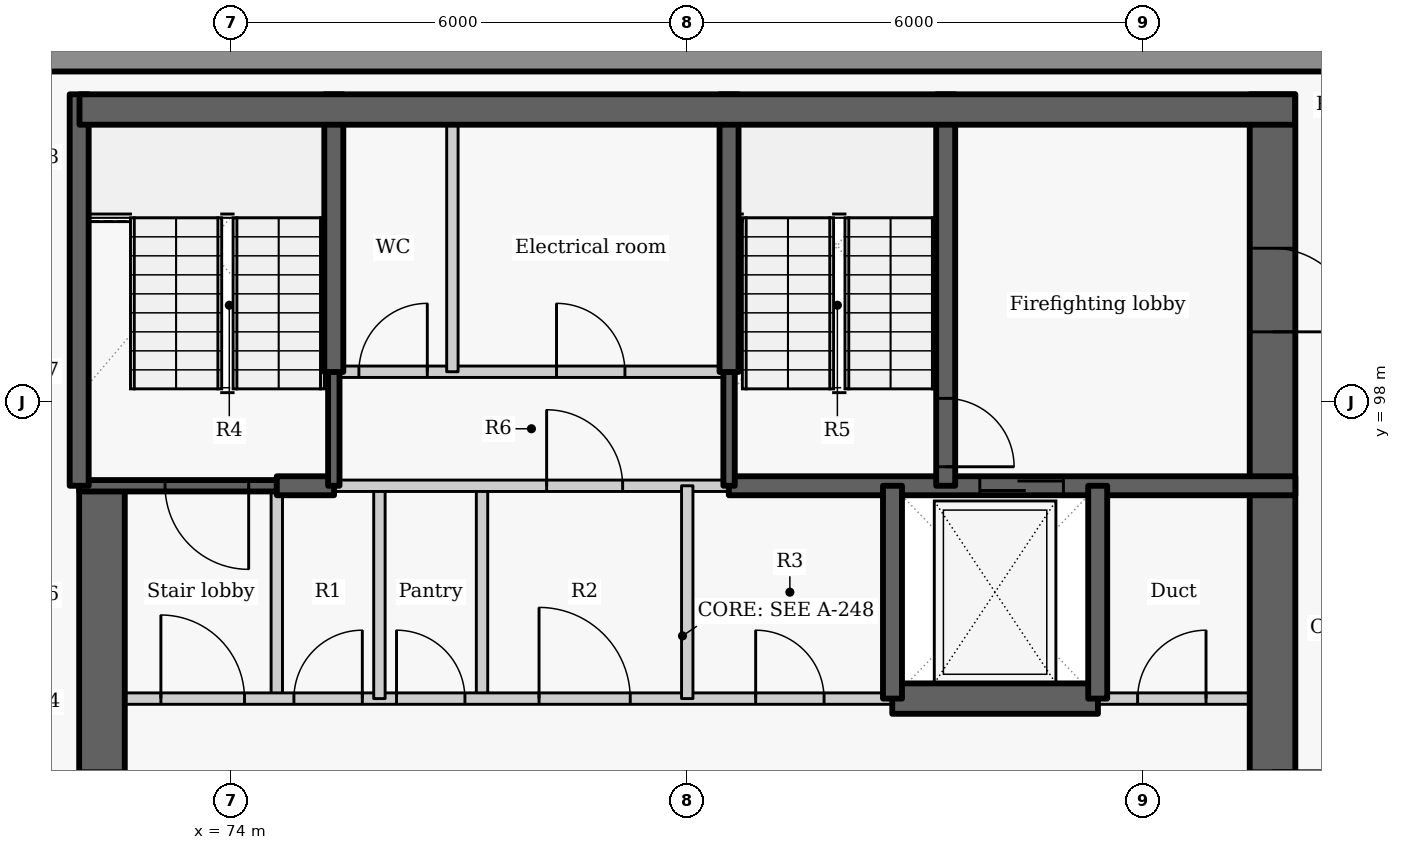
"""IFC4 building model, lengths in metres.
Left out: names, types, materials, properties, quantities, classifications, styles, units other than length and angle.
Written with IfcOpenShell. Run it as: python <this file> out.ifc"""

import sys

from ifc_helpers import new_model, si_unit, direction, frame, frame_2d, origin, place, context, subcontext, project, spatial, rectangle, extrude, element, fill, save


model = new_model("IFC4")
c1 = context("Model", 3, precision=1e-05, world=origin(), true_north=direction((0.0, 1.0)))
c2 = subcontext(c1, "Body", "Model", "MODEL_VIEW")
j1 = project(units=[si_unit("LENGTHUNIT", "METRE"), si_unit("PLANEANGLEUNIT", "RADIAN")], contexts=[c1])
p1 = place(None, origin())
s1 = spatial("IfcSite", under=j1, at=p1, CompositionType="ELEMENT")
p2 = place(p1, origin())
s2 = spatial("IfcBuilding", under=s1, at=p2, CompositionType="ELEMENT")
p3 = place(p2, frame((0.0, 0.0, 283.2)))
s3 = spatial("IfcBuildingStorey", under=s2, at=p3, CompositionType="ELEMENT", Elevation=283.2)
p4 = place(p3, frame((89.549, 102.5, 0.0), z_axis=(0.0, 0.0, 1.0), x_axis=(-1.0, 0.0, 0.0)))
e1 = element("IfcWall", 1, at=p4, inside=s3, PredefinedType="SOLIDWALL", context=c2, shape_type="SweptSolid", body=[
    extrude(rectangle(XDim=19.134, YDim=0.3, at=frame_2d((9.567, 0.0))), origin(), (0.0, 0.0, 1.0), 2.725),
])
p5 = place(p3, frame((74.6, 94.1, 0.0), z_axis=(0.0, 0.0, 1.0), x_axis=(0.0, 1.0, 0.0)))
e2 = element("IfcWall", 2, at=p5, inside=s3, PredefinedType="PARTITIONING", context=c2, shape_type="SweptSolid", body=[
    extrude(rectangle(XDim=2.8, YDim=0.15, at=frame_2d((1.4, 0.0))), origin(), (0.0, 0.0, 1.0), 3.325),
])
p6 = place(p3, frame((72.3, 87.8, -0.275), z_axis=(0.0, 0.0, 1.0), x_axis=(0.0, 1.0, 0.0)))
e3 = element("IfcWall", 3, at=p6, inside=s3, PredefinedType="SHEAR", context=c2, shape_type="SweptSolid", body=[
    extrude(rectangle(XDim=9.1, YDim=0.6, at=frame_2d((4.55, 0.0))), origin(), (0.0, 0.0, 1.0), 3.6),
])
p7 = place(p6, frame((3.85, 0.0, 0.275)))
e4 = element("IfcOpeningElement", 4, at=p7, cuts=e3, PredefinedType="OPENING", context=c2, shape_type="SweptSolid", body=[
    extrude(rectangle(XDim=1.5, YDim=2.1, at=frame_2d((0.75, 1.05))), frame((0.0, 0.31, 0.0), z_axis=(0.0, -1.0, 0.0), x_axis=(1.0, 0.0, 0.0)), (0.0, 0.0, 1.0), 0.62),
])
p8 = place(p3, frame((77.3, 94.1, 0.0), z_axis=(0.0, 0.0, 1.0), x_axis=(0.0, 1.0, 0.0)))
e5 = element("IfcWall", 5, at=p8, inside=s3, PredefinedType="PARTITIONING", context=c2, shape_type="SweptSolid", body=[
    extrude(rectangle(XDim=2.8, YDim=0.15, at=frame_2d((1.4, 0.0))), origin(), (0.0, 0.0, 1.0), 3.325),
])
p9 = place(p3, frame((72.0, 94.1, 0.0), z_axis=(0.0, 0.0, 1.0), x_axis=(1.0, 0.0, 0.0)))
e6 = element("IfcWall", 6, at=p9, inside=s3, PredefinedType="PARTITIONING", context=c2, shape_type="SweptSolid", body=[
    extrude(rectangle(XDim=10.703, YDim=0.15, at=frame_2d((5.352, 0.0))), origin(), (0.0, 0.0, 1.0), 3.325),
])
p10 = place(p9, frame((1.075, 0.0, 0.0)))
e7 = element("IfcOpeningElement", 7, at=p10, cuts=e6, PredefinedType="OPENING", context=c2, shape_type="SweptSolid", body=[
    extrude(rectangle(XDim=1.1, YDim=2.1, at=frame_2d((0.55, 1.05))), frame((0.0, 0.085, 0.0), z_axis=(0.0, -1.0, 0.0), x_axis=(1.0, 0.0, 0.0)), (0.0, 0.0, 1.0), 0.17),
])
p11 = place(p9, frame((2.825, 0.0, 0.0)))
e8 = element("IfcOpeningElement", 8, at=p11, cuts=e6, PredefinedType="OPENING", context=c2, shape_type="SweptSolid", body=[
    extrude(rectangle(XDim=0.9, YDim=2.1, at=frame_2d((0.45, 1.05))), frame((0.0, 0.085, 0.0), z_axis=(0.0, -1.0, 0.0), x_axis=(1.0, 0.0, 0.0)), (0.0, 0.0, 1.0), 0.17),
])
p12 = place(p9, frame((4.175, 0.0, 0.0)))
e9 = element("IfcOpeningElement", 9, at=p12, cuts=e6, PredefinedType="OPENING", context=c2, shape_type="SweptSolid", body=[
    extrude(rectangle(XDim=0.9, YDim=2.1, at=frame_2d((0.45, 1.05))), frame((0.0, 0.085, 0.0), z_axis=(0.0, -1.0, 0.0), x_axis=(1.0, 0.0, 0.0)), (0.0, 0.0, 1.0), 0.17),
])
p13 = place(p9, frame((6.05, 0.0, 0.0)))
e10 = element("IfcOpeningElement", 10, at=p13, cuts=e6, PredefinedType="OPENING", context=c2, shape_type="SweptSolid", body=[
    extrude(rectangle(XDim=1.2, YDim=2.1, at=frame_2d((0.6, 1.05))), frame((0.0, 0.085, 0.0), z_axis=(0.0, -1.0, 0.0), x_axis=(1.0, 0.0, 0.0)), (0.0, 0.0, 1.0), 0.17),
])
p14 = place(p9, frame((8.9, 0.0, 0.0)))
e11 = element("IfcOpeningElement", 11, at=p14, cuts=e6, PredefinedType="OPENING", context=c2, shape_type="SweptSolid", body=[
    extrude(rectangle(XDim=0.9, YDim=2.1, at=frame_2d((0.45, 1.05))), frame((0.0, 0.085, 0.0), z_axis=(0.0, -1.0, 0.0), x_axis=(1.0, 0.0, 0.0)), (0.0, 0.0, 1.0), 0.17),
])
p15 = place(p3, frame((85.397, 94.1, 0.0), z_axis=(0.0, 0.0, 1.0), x_axis=(1.0, 0.0, 0.0)))
e12 = element("IfcWall", 12, at=p15, inside=s3, PredefinedType="PARTITIONING", context=c2, shape_type="SweptSolid", body=[
    extrude(rectangle(XDim=2.603, YDim=0.15, at=frame_2d((1.302, 0.0))), origin(), (0.0, 0.0, 1.0), 3.325),
])
p16 = place(p15, frame((0.528, 0.0, 0.0)))
e13 = element("IfcOpeningElement", 13, at=p16, cuts=e12, PredefinedType="OPENING", context=c2, shape_type="SweptSolid", body=[
    extrude(rectangle(XDim=0.9, YDim=2.1, at=frame_2d((0.45, 1.05))), frame((0.0, 0.085, 0.0), z_axis=(0.0, -1.0, 0.0), x_axis=(1.0, 0.0, 0.0)), (0.0, 0.0, 1.0), 0.17),
])
p17 = place(p3, frame((82.697, 94.1, -0.275), z_axis=(0.0, 0.0, 1.0), x_axis=(1.0, 0.0, 0.0)))
e14 = element("IfcWall", 14, at=p17, inside=s3, PredefinedType="SHEAR", context=c2, shape_type="SweptSolid", body=[
    extrude(rectangle(XDim=2.706, YDim=0.4, at=frame_2d((1.353, 0.0))), origin(), (0.0, 0.0, 1.0), 3.6),
])
p18 = place(p3, frame((87.7, 102.05, -0.275), z_axis=(0.0, 0.0, 1.0), x_axis=(0.0, -1.0, 0.0)))
e15 = element("IfcWall", 15, at=p18, inside=s3, PredefinedType="SHEAR", context=c2, shape_type="SweptSolid", body=[
    extrude(rectangle(XDim=11.35, YDim=0.6, at=frame_2d((5.675, 0.0))), origin(), (0.0, 0.0, 1.0), 3.6),
])
p19 = place(p18, frame((8.9, 0.0, 0.275)))
e16 = element("IfcOpeningElement", 16, at=p19, cuts=e15, PredefinedType="OPENING", context=c2, shape_type="SweptSolid", body=[
    extrude(rectangle(XDim=1.5, YDim=2.1, at=frame_2d((0.75, 1.05))), frame((0.0, 0.31, 0.0), z_axis=(0.0, -1.0, 0.0), x_axis=(1.0, 0.0, 0.0)), (0.0, 0.0, 1.0), 0.62),
])
p20 = place(p18, frame((2.025, 0.0, 0.275)))
e17 = element("IfcOpeningElement", 17, at=p20, cuts=e15, PredefinedType="OPENING", context=c2, shape_type="SweptSolid", body=[
    extrude(rectangle(XDim=1.1, YDim=2.1, at=frame_2d((0.55, 1.05))), frame((0.0, 0.31, 0.0), z_axis=(0.0, -1.0, 0.0), x_axis=(1.0, 0.0, 0.0)), (0.0, 0.0, 1.0), 0.62),
])
p21 = place(p3, frame((74.6, 96.9, -0.275), z_axis=(0.0, 0.0, 1.0), x_axis=(-1.0, 0.0, 0.0)))
e18 = element("IfcWall", 18, at=p21, inside=s3, PredefinedType="SHEAR", context=c2, shape_type="SweptSolid", body=[
    extrude(rectangle(XDim=2.6, YDim=0.15, at=frame_2d((1.3, 0.0))), origin(), (0.0, 0.0, 1.0), 3.6),
])
p22 = place(p21, frame((0.37, 0.0, 0.275)))
e19 = element("IfcOpeningElement", 19, at=p22, cuts=e18, PredefinedType="OPENING", context=c2, shape_type="SweptSolid", body=[
    extrude(rectangle(XDim=1.1, YDim=2.1, at=frame_2d((0.55, 1.05))), frame((0.0, 0.085, 0.0), z_axis=(0.0, -1.0, 0.0), x_axis=(1.0, 0.0, 0.0)), (0.0, 0.0, 1.0), 0.17),
])
p23 = place(p3, frame((75.95, 94.1, 0.0), z_axis=(0.0, 0.0, 1.0), x_axis=(0.0, 1.0, 0.0)))
e20 = element("IfcWall", 20, at=p23, inside=s3, PredefinedType="PARTITIONING", context=c2, shape_type="SweptSolid", body=[
    extrude(rectangle(XDim=2.8, YDim=0.15, at=frame_2d((1.4, 0.0))), origin(), (0.0, 0.0, 1.0), 3.325),
])
p24 = place(p3, frame((74.6, 96.9, -0.275), z_axis=(0.0, 0.0, 1.0), x_axis=(1.0, 0.0, 0.0)))
e21 = element("IfcWall", 21, at=p24, inside=s3, PredefinedType="SHEAR", context=c2, shape_type="SweptSolid", body=[
    extrude(rectangle(XDim=0.753, YDim=0.25, at=frame_2d((0.376, 0.0))), origin(), (0.0, 0.0, 1.0), 3.6),
])
p25 = place(p3, frame((80.547, 96.9, -0.275), z_axis=(0.0, 0.0, 1.0), x_axis=(1.0, 0.0, 0.0)))
e22 = element("IfcWall", 22, at=p25, inside=s3, PredefinedType="SHEAR", context=c2, shape_type="SweptSolid", body=[
    extrude(rectangle(XDim=7.453, YDim=0.25, at=frame_2d((3.727, 0.0))), origin(), (0.0, 0.0, 1.0), 3.6),
])
p26 = place(p25, frame((3.302, 0.0, 0.275)))
e23 = element("IfcOpeningElement", 23, at=p26, cuts=e22, PredefinedType="OPENING", context=c2, shape_type="SweptSolid", body=[
    extrude(rectangle(XDim=1.1, YDim=2.1, at=frame_2d((0.55, 1.05))), frame((0.0, 0.135, 0.0), z_axis=(0.0, -1.0, 0.0), x_axis=(1.0, 0.0, 0.0)), (0.0, 0.0, 1.0), 0.27),
])
p27 = place(p3, frame((75.347, 96.9, 0.0), z_axis=(0.0, 0.0, 1.0), x_axis=(1.0, 0.0, 0.0)))
e24 = element("IfcWall", 24, at=p27, inside=s3, PredefinedType="PARTITIONING", context=c2, shape_type="SweptSolid", body=[
    extrude(rectangle(XDim=5.206, YDim=0.15, at=frame_2d((2.603, 0.0))), origin(), (0.0, 0.0, 1.0), 3.325),
])
p28 = place(p27, frame((2.803, 0.0, 0.0)))
e25 = element("IfcOpeningElement", 25, at=p28, cuts=e24, PredefinedType="OPENING", context=c2, shape_type="SweptSolid", body=[
    extrude(rectangle(XDim=1.0, YDim=2.1, at=frame_2d((0.5, 1.05))), frame((0.0, 0.085, 0.0), z_axis=(0.0, -1.0, 0.0), x_axis=(1.0, 0.0, 0.0)), (0.0, 0.0, 1.0), 0.17),
])
p29 = place(p3, frame((80.0, 94.1, 0.0), z_axis=(0.0, 0.0, 1.0), x_axis=(0.0, 1.0, 0.0)))
e26 = element("IfcWall", 26, at=p29, inside=s3, PredefinedType="PARTITIONING", context=c2, shape_type="SweptSolid", body=[
    extrude(rectangle(XDim=2.8, YDim=0.15, at=frame_2d((1.4, 0.0))), origin(), (0.0, 0.0, 1.0), 3.325),
])
for number, where, z_axis, x_axis in (
    (27, (82.7, 94.1, -0.275), (0.0, 0.0, 1.0), (0.0, 1.0, 0.0)),
    (28, (85.4, 94.1, -0.275), (0.0, 0.0, 1.0), (0.0, 1.0, 0.0)),
):
    element("IfcWall", number, at=place(p3, frame(where, z_axis=z_axis, x_axis=x_axis)), inside=s3, PredefinedType="SHEAR", context=c2, shape_type="SweptSolid", body=[
        extrude(rectangle(XDim=2.8, YDim=0.25, at=frame_2d((1.4, 0.0))), origin(), (0.0, 0.0, 1.0), 3.6),
    ])
p30 = place(p3, frame((75.35, 96.9, -0.275), z_axis=(0.0, 0.0, 1.0), x_axis=(0.0, 1.0, 0.0)))
e29 = element("IfcWall", 29, at=p30, inside=s3, PredefinedType="SHEAR", context=c2, shape_type="SweptSolid", body=[
    extrude(rectangle(XDim=1.503, YDim=0.15, at=frame_2d((0.751, 0.0))), origin(), (0.0, 0.0, 1.0), 3.6),
])
p31 = place(p3, frame((75.35, 98.397, -0.275), z_axis=(0.0, 0.0, 1.0), x_axis=(0.0, 1.0, 0.0)))
e30 = element("IfcWall", 30, at=p31, inside=s3, PredefinedType="SHEAR", context=c2, shape_type="SweptSolid", body=[
    extrude(rectangle(XDim=3.653, YDim=0.25, at=frame_2d((1.827, 0.0))), origin(), (0.0, 0.0, 1.0), 3.6),
])
p32 = place(p3, frame((72.0, 96.9, -0.275), z_axis=(0.0, 0.0, 1.0), x_axis=(0.0, 1.0, 0.0)))
e31 = element("IfcWall", 31, at=p32, inside=s3, PredefinedType="SHEAR", context=c2, shape_type="SweptSolid", body=[
    extrude(rectangle(XDim=5.15, YDim=0.25, at=frame_2d((2.575, 0.0))), origin(), (0.0, 0.0, 1.0), 3.6),
])
p33 = place(p3, frame((83.4, 102.05, -0.275), z_axis=(0.0, 0.0, 1.0), x_axis=(0.0, -1.0, 0.0)))
e32 = element("IfcWall", 32, at=p33, inside=s3, PredefinedType="SHEAR", context=c2, shape_type="SweptSolid", body=[
    extrude(rectangle(XDim=5.15, YDim=0.25, at=frame_2d((2.575, 0.0))), origin(), (0.0, 0.0, 1.0), 3.6),
])
p34 = place(p33, frame((4.0, 0.0, 0.275)))
e33 = element("IfcOpeningElement", 33, at=p34, cuts=e32, PredefinedType="OPENING", context=c2, shape_type="SweptSolid", body=[
    extrude(rectangle(XDim=0.9, YDim=2.1, at=frame_2d((0.45, 1.05))), frame((0.0, 0.135, 0.0), z_axis=(0.0, -1.0, 0.0), x_axis=(1.0, 0.0, 0.0)), (0.0, 0.0, 1.0), 0.27),
])
p35 = place(p3, frame((80.55, 96.9, -0.275), z_axis=(0.0, 0.0, 1.0), x_axis=(0.0, 1.0, 0.0)))
e34 = element("IfcWall", 34, at=p35, inside=s3, PredefinedType="SHEAR", context=c2, shape_type="SweptSolid", body=[
    extrude(rectangle(XDim=1.503, YDim=0.15, at=frame_2d((0.751, 0.0))), origin(), (0.0, 0.0, 1.0), 3.6),
])
p36 = place(p3, frame((80.55, 98.397, -0.275), z_axis=(0.0, 0.0, 1.0), x_axis=(0.0, 1.0, 0.0)))
e35 = element("IfcWall", 35, at=p36, inside=s3, PredefinedType="SHEAR", context=c2, shape_type="SweptSolid", body=[
    extrude(rectangle(XDim=3.653, YDim=0.25, at=frame_2d((1.827, 0.0))), origin(), (0.0, 0.0, 1.0), 3.6),
])
p37 = place(p3, frame((75.35, 98.4, 0.0), z_axis=(0.0, 0.0, 1.0), x_axis=(1.0, 0.0, 0.0)))
e36 = element("IfcWall", 36, at=p37, inside=s3, PredefinedType="PARTITIONING", context=c2, shape_type="SweptSolid", body=[
    extrude(rectangle(XDim=5.2, YDim=0.15, at=frame_2d((2.6, 0.0))), origin(), (0.0, 0.0, 1.0), 3.325),
])
p38 = place(p37, frame((0.33, 0.0, 0.0)))
e37 = element("IfcOpeningElement", 37, at=p38, cuts=e36, PredefinedType="OPENING", context=c2, shape_type="SweptSolid", body=[
    extrude(rectangle(XDim=0.9, YDim=2.1, at=frame_2d((0.45, 1.05))), frame((0.0, 0.085, 0.0), z_axis=(0.0, -1.0, 0.0), x_axis=(1.0, 0.0, 0.0)), (0.0, 0.0, 1.0), 0.17),
])
p39 = place(p37, frame((2.93, 0.0, 0.0)))
e38 = element("IfcOpeningElement", 38, at=p39, cuts=e36, PredefinedType="OPENING", context=c2, shape_type="SweptSolid", body=[
    extrude(rectangle(XDim=0.9, YDim=2.1, at=frame_2d((0.45, 1.05))), frame((0.0, 0.085, 0.0), z_axis=(0.0, -1.0, 0.0), x_axis=(1.0, 0.0, 0.0)), (0.0, 0.0, 1.0), 0.17),
])
p40 = place(p3, frame((76.91, 98.4, 0.0), z_axis=(0.0, 0.0, 1.0), x_axis=(0.0, 1.0, 0.0)))
e39 = element("IfcWall", 39, at=p40, inside=s3, PredefinedType="PARTITIONING", context=c2, shape_type="SweptSolid", body=[
    extrude(rectangle(XDim=3.65, YDim=0.15, at=frame_2d((1.825, 0.0))), origin(), (0.0, 0.0, 1.0), 3.325),
])
p41 = place(p3, frame((72.004, 101.85, -0.275), z_axis=(0.0, 0.0, 1.0), x_axis=(1.0, 0.0, 0.0)))
e40 = element("IfcWall", 40, at=p41, inside=s3, PredefinedType="SHEAR", context=c2, shape_type="SweptSolid", body=[
    extrude(rectangle(XDim=15.992, YDim=0.4, at=frame_2d((7.996, 0.0))), origin(), (0.0, 0.0, 1.0), 3.6),
])
p42 = place(p10, origin())
e41 = element("IfcDoor", 41, at=p42, inside=s3, OperationType="SINGLE_SWING_LEFT", PredefinedType="DOOR", context=c2, shape_type="SweptSolid", body=[
    extrude(rectangle(XDim=1.1, YDim=2.1, at=frame_2d((0.55, 1.05))), frame((0.0, 0.025, 0.0), z_axis=(0.0, -1.0, 0.0), x_axis=(1.0, 0.0, 0.0)), (0.0, 0.0, 1.0), 0.05),
])
fill(e7, e41)
p43 = place(p11, origin())
e42 = element("IfcDoor", 42, at=p43, inside=s3, OperationType="SINGLE_SWING_RIGHT", PredefinedType="DOOR", context=c2, shape_type="SweptSolid", body=[
    extrude(rectangle(XDim=0.9, YDim=2.1, at=frame_2d((0.45, 1.05))), frame((0.0, 0.025, 0.0), z_axis=(0.0, -1.0, 0.0), x_axis=(1.0, 0.0, 0.0)), (0.0, 0.0, 1.0), 0.05),
])
fill(e8, e42)
p44 = place(p12, origin())
e43 = element("IfcDoor", 43, at=p44, inside=s3, OperationType="SINGLE_SWING_LEFT", PredefinedType="DOOR", context=c2, shape_type="SweptSolid", body=[
    extrude(rectangle(XDim=0.9, YDim=2.1, at=frame_2d((0.45, 1.05))), frame((0.0, 0.025, 0.0), z_axis=(0.0, -1.0, 0.0), x_axis=(1.0, 0.0, 0.0)), (0.0, 0.0, 1.0), 0.05),
])
fill(e9, e43)
p45 = place(p13, origin())
e44 = element("IfcDoor", 44, at=p45, inside=s3, OperationType="DOUBLE_DOOR_SINGLE_SWING", PredefinedType="DOOR", context=c2, shape_type="SweptSolid", body=[
    extrude(rectangle(XDim=1.2, YDim=2.1, at=frame_2d((0.6, 1.05))), frame((0.0, 0.025, 0.0), z_axis=(0.0, -1.0, 0.0), x_axis=(1.0, 0.0, 0.0)), (0.0, 0.0, 1.0), 0.05),
])
fill(e10, e44)
p46 = place(p14, origin())
e45 = element("IfcDoor", 45, at=p46, inside=s3, OperationType="SINGLE_SWING_LEFT", PredefinedType="DOOR", context=c2, shape_type="SweptSolid", body=[
    extrude(rectangle(XDim=0.9, YDim=2.1, at=frame_2d((0.45, 1.05))), frame((0.0, 0.025, 0.0), z_axis=(0.0, -1.0, 0.0), x_axis=(1.0, 0.0, 0.0)), (0.0, 0.0, 1.0), 0.05),
])
fill(e11, e45)
p47 = place(p26, origin())
e46 = element("IfcDoor", 46, at=p47, inside=s3, OperationType="SLIDING_TO_LEFT", PredefinedType="DOOR", context=c2, shape_type="SweptSolid", body=[
    extrude(rectangle(XDim=1.1, YDim=2.1, at=frame_2d((0.55, 1.05))), frame((0.0, 0.025, 0.0), z_axis=(0.0, -1.0, 0.0), x_axis=(1.0, 0.0, 0.0)), (0.0, 0.0, 1.0), 0.05),
])
fill(e23, e46)
p48 = place(p16, origin())
e47 = element("IfcDoor", 47, at=p48, inside=s3, OperationType="SINGLE_SWING_RIGHT", PredefinedType="DOOR", context=c2, shape_type="SweptSolid", body=[
    extrude(rectangle(XDim=0.9, YDim=2.1, at=frame_2d((0.45, 1.05))), frame((0.0, 0.025, 0.0), z_axis=(0.0, -1.0, 0.0), x_axis=(1.0, 0.0, 0.0)), (0.0, 0.0, 1.0), 0.05),
])
fill(e13, e47)
p49 = place(p28, origin())
e48 = element("IfcDoor", 48, at=p49, inside=s3, OperationType="SINGLE_SWING_LEFT", PredefinedType="DOOR", context=c2, shape_type="SweptSolid", body=[
    extrude(rectangle(XDim=1.0, YDim=2.1, at=frame_2d((0.5, 1.05))), frame((0.0, 0.025, 0.0), z_axis=(0.0, -1.0, 0.0), x_axis=(1.0, 0.0, 0.0)), (0.0, 0.0, 1.0), 0.05),
])
fill(e25, e48)
p50 = place(p38, origin())
e49 = element("IfcDoor", 49, at=p50, inside=s3, OperationType="SINGLE_SWING_RIGHT", PredefinedType="DOOR", context=c2, shape_type="SweptSolid", body=[
    extrude(rectangle(XDim=0.9, YDim=2.1, at=frame_2d((0.45, 1.05))), frame((0.0, 0.025, 0.0), z_axis=(0.0, -1.0, 0.0), x_axis=(1.0, 0.0, 0.0)), (0.0, 0.0, 1.0), 0.05),
])
fill(e37, e49)
p51 = place(p39, origin())
e50 = element("IfcDoor", 50, at=p51, inside=s3, OperationType="SINGLE_SWING_LEFT", PredefinedType="DOOR", context=c2, shape_type="SweptSolid", body=[
    extrude(rectangle(XDim=0.9, YDim=2.1, at=frame_2d((0.45, 1.05))), frame((0.0, 0.025, 0.0), z_axis=(0.0, -1.0, 0.0), x_axis=(1.0, 0.0, 0.0)), (0.0, 0.0, 1.0), 0.05),
])
fill(e38, e50)
p52 = place(p22, origin())
e51 = element("IfcDoor", 51, at=p52, inside=s3, OperationType="SINGLE_SWING_LEFT", PredefinedType="DOOR", context=c2, shape_type="SweptSolid", body=[
    extrude(rectangle(XDim=1.1, YDim=2.1, at=frame_2d((0.55, 1.05))), frame((0.0, 0.025, 0.0), z_axis=(0.0, -1.0, 0.0), x_axis=(1.0, 0.0, 0.0)), (0.0, 0.0, 1.0), 0.05),
])
fill(e19, e51)
p53 = place(p34, origin())
e52 = element("IfcDoor", 52, at=p53, inside=s3, OperationType="SINGLE_SWING_RIGHT", PredefinedType="DOOR", context=c2, shape_type="SweptSolid", body=[
    extrude(rectangle(XDim=0.9, YDim=2.1, at=frame_2d((0.45, 1.05))), frame((0.0, 0.025, 0.0), z_axis=(0.0, -1.0, 0.0), x_axis=(1.0, 0.0, 0.0)), (0.0, 0.0, 1.0), 0.05),
])
fill(e33, e52)
p54 = place(p19, origin())
e53 = element("IfcDoor", 53, at=p54, inside=s3, OperationType="DOUBLE_DOOR_SINGLE_SWING", PredefinedType="DOOR", context=c2, shape_type="SweptSolid", body=[
    extrude(rectangle(XDim=1.5, YDim=2.1, at=frame_2d((0.75, 1.05))), frame((0.0, 0.025, 0.0), z_axis=(0.0, -1.0, 0.0), x_axis=(1.0, 0.0, 0.0)), (0.0, 0.0, 1.0), 0.05),
])
fill(e16, e53)
p55 = place(p7, origin())
e54 = element("IfcDoor", 54, at=p55, inside=s3, OperationType="DOUBLE_DOOR_SINGLE_SWING", PredefinedType="DOOR", context=c2, shape_type="SweptSolid", body=[
    extrude(rectangle(XDim=1.5, YDim=2.1, at=frame_2d((0.75, 1.05))), frame((0.0, 0.025, 0.0), z_axis=(0.0, -1.0, 0.0), x_axis=(1.0, 0.0, 0.0)), (0.0, 0.0, 1.0), 0.05),
])
fill(e4, e54)
p56 = place(p20, origin())
e55 = element("IfcDoor", 55, at=p56, inside=s3, OperationType="SINGLE_SWING_RIGHT", PredefinedType="DOOR", context=c2, shape_type="SweptSolid", body=[
    extrude(rectangle(XDim=1.1, YDim=2.1, at=frame_2d((0.55, 1.05))), frame((0.0, 0.025, 0.0), z_axis=(0.0, -1.0, 0.0), x_axis=(1.0, 0.0, 0.0)), (0.0, 0.0, 1.0), 0.05),
])
fill(e17, e55)
save(model, sys.argv[1])
